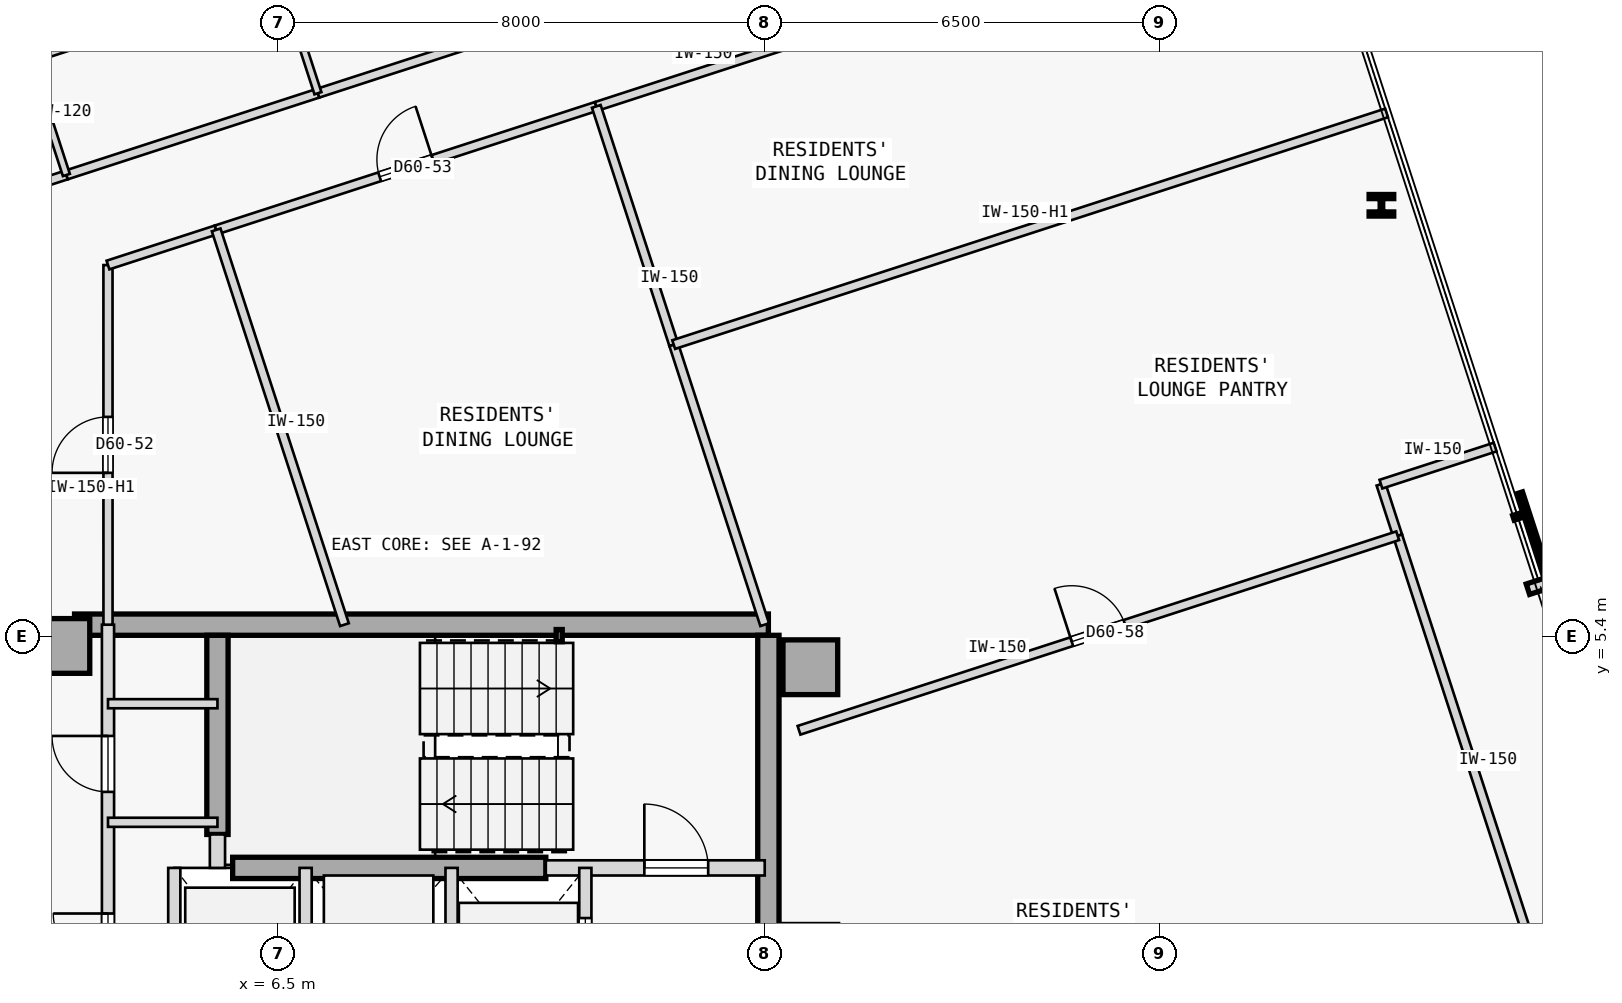
"""IFC4 building model, lengths in metres.
Left out: names, types, materials, properties, quantities, classifications, styles, units other than length and angle.
Written with IfcOpenShell. Run it as: python <this file> out.ifc"""

import sys

from ifc_helpers import new_model, si_unit, direction, frame, frame_2d, origin, origin_2d, place, context, subcontext, project, spatial, rectangle, hollow_rectangle, i_section, extrude, element, fill, save


model = new_model("IFC4")
c1 = context("Model", 3, precision=1e-05, world=origin(), true_north=direction((0.0, 1.0)))
c2 = subcontext(c1, "Body", "Model", "MODEL_VIEW")
j1 = project(units=[si_unit("LENGTHUNIT", "METRE"), si_unit("PLANEANGLEUNIT", "RADIAN")], contexts=[c1])
p1 = place(None, origin())
s1 = spatial("IfcSite", under=j1, at=p1, CompositionType="ELEMENT")
p2 = place(p1, origin())
s2 = spatial("IfcBuilding", under=s1, at=p2, CompositionType="ELEMENT")
p3 = place(p2, frame((0.0, 0.0, 227.65)))
s3 = spatial("IfcBuildingStorey", under=s2, at=p3, CompositionType="ELEMENT", Elevation=227.65)
for number, where, z_axis, x_axis in (
    (1, (15.25, 4.9, 0.0), (0.0, 0.0, 1.0), (1.0, 0.0, 0.0)),
    (2, (2.95, 5.25, 0.0), (0.0, 0.0, 1.0), (1.0, 0.0, 0.0)),
):
    element("IfcColumn", number, at=place(p3, frame(where, z_axis=z_axis, x_axis=x_axis)), inside=s3, PredefinedType="COLUMN", context=c2, shape_type="SweptSolid", body=[
        extrude(rectangle(XDim=0.9, YDim=0.9, at=origin_2d()), origin(), (0.0, 0.0, 1.0), 3.35),
    ])
p4 = place(p3, frame((3.15, 5.6, 0.0), z_axis=(0.0, 0.0, 1.0), x_axis=(1.0, 0.0, 0.0)))
e3 = element("IfcWall", 3, at=p4, inside=s3, PredefinedType="SHEAR", context=c2, shape_type="SweptSolid", body=[
    extrude(rectangle(XDim=11.41, YDim=0.35, at=frame_2d((5.705, 0.0))), origin(), (0.0, 0.0, 1.0), 3.125),
])
p5 = place(p3, frame((14.56, -5.425, 0.0), z_axis=(0.0, 0.0, 1.0), x_axis=(0.0, 1.0, 0.0)))
e4 = element("IfcWall", 4, at=p5, inside=s3, PredefinedType="SHEAR", context=c2, shape_type="SweptSolid", body=[
    extrude(rectangle(XDim=10.85, YDim=0.35, at=frame_2d((5.425, 0.0))), origin(), (0.0, 0.0, 1.0), 3.125),
])
p6 = place(p3, frame((5.5, 2.15, 0.0), z_axis=(0.0, 0.0, 1.0), x_axis=(0.0, 1.0, 0.0)))
e5 = element("IfcWall", 5, at=p6, inside=s3, PredefinedType="SHEAR", context=c2, shape_type="SweptSolid", body=[
    extrude(rectangle(XDim=3.275, YDim=0.35, at=frame_2d((1.638, 0.0))), origin(), (0.0, 0.0, 1.0), 3.125),
])
p7 = place(p3, frame((5.75, 1.6, 0.0), z_axis=(0.0, 0.0, 1.0), x_axis=(1.0, 0.0, 0.0)))
e6 = element("IfcWall", 6, at=p7, inside=s3, PredefinedType="SHEAR", context=c2, shape_type="SweptSolid", body=[
    extrude(rectangle(XDim=5.15, YDim=0.35, at=frame_2d((2.575, 0.0))), origin(), (0.0, 0.0, 1.0), 3.125),
])
p8 = place(p3, frame((11.12, 5.42, 0.0), z_axis=(0.0, 0.0, 1.0), x_axis=(1.0, 0.0, 0.0)))
e7 = element("IfcColumn", 7, at=p8, inside=s3, PredefinedType="COLUMN", context=c2, shape_type="SweptSolid", body=[
    extrude(hollow_rectangle(XDim=0.1, YDim=0.2, WallThickness=0.008, at=origin_2d()), origin(), (0.0, 0.0, 1.0), 3.35),
])
p9 = place(p3, frame((24.642, 12.497, 0.0), z_axis=(0.0, 0.0, 1.0), x_axis=(1.0, 0.0, 0.0)))
e8 = element("IfcColumn", 8, at=p9, inside=s3, PredefinedType="COLUMN", context=c2, shape_type="SweptSolid", body=[
    extrude(i_section(OverallWidth=0.405, OverallDepth=0.355, WebThickness=0.042, FlangeThickness=0.068, FilletRadius=0.015, at=origin_2d()), origin(), (0.0, 0.0, 1.0), 3.35),
])
p10 = place(p3, frame((10.9, 1.6, 0.0), z_axis=(0.0, 0.0, 1.0), x_axis=(1.0, 0.0, 0.0)))
e9 = element("IfcWall", 9, at=p10, inside=s3, PredefinedType="STANDARD", context=c2, shape_type="SweptSolid", body=[
    extrude(rectangle(XDim=3.6, YDim=0.25, at=frame_2d((1.8, 0.0))), origin(), (0.0, 0.0, 1.0), 3.125),
])
p11 = place(p10, frame((1.62, 0.0, 0.0)))
e10 = element("IfcOpeningElement", 10, at=p11, cuts=e9, PredefinedType="OPENING", context=c2, shape_type="SweptSolid", body=[
    extrude(rectangle(XDim=1.05, YDim=2.15, at=frame_2d((0.525, 1.075))), frame((0.0, 0.135, 0.0), z_axis=(0.0, -1.0, 0.0), x_axis=(1.0, 0.0, 0.0)), (0.0, 0.0, 1.0), 0.27),
])
p12 = place(p3, frame((5.5, 1.6, 0.0), z_axis=(0.0, 0.0, 1.0), x_axis=(0.0, 1.0, 0.0)))
e11 = element("IfcWall", 11, at=p12, inside=s3, PredefinedType="STANDARD", context=c2, shape_type="SweptSolid", body=[
    extrude(rectangle(XDim=0.55, YDim=0.25, at=frame_2d((0.275, 0.0))), origin(), (0.0, 0.0, 1.0), 3.125),
])
p13 = place(p3, frame((3.7, -1.15, 0.0), z_axis=(0.0, 0.0, 1.0), x_axis=(0.0, 1.0, 0.0)))
e12 = element("IfcWall", 12, at=p13, inside=s3, PredefinedType="STANDARD", context=c2, shape_type="SweptSolid", body=[
    extrude(rectangle(XDim=6.75, YDim=0.2, at=frame_2d((3.375, 0.0))), origin(), (0.0, 0.0, 1.0), 3.125),
])
p14 = place(p13, frame((1.1, 0.0, 0.0)))
e13 = element("IfcOpeningElement", 13, at=p14, cuts=e12, PredefinedType="OPENING", context=c2, shape_type="SweptSolid", body=[
    extrude(rectangle(XDim=0.9, YDim=2.15, at=frame_2d((0.45, 1.075))), frame((0.0, 0.11, 0.0), z_axis=(0.0, -1.0, 0.0), x_axis=(1.0, 0.0, 0.0)), (0.0, 0.0, 1.0), 0.22),
])
p15 = place(p13, frame((4.0, 0.0, 0.0)))
e14 = element("IfcOpeningElement", 14, at=p15, cuts=e12, PredefinedType="OPENING", context=c2, shape_type="SweptSolid", body=[
    extrude(rectangle(XDim=0.92, YDim=2.15, at=frame_2d((0.46, 1.075))), frame((0.0, 0.11, 0.0), z_axis=(0.0, -1.0, 0.0), x_axis=(1.0, 0.0, 0.0)), (0.0, 0.0, 1.0), 0.22),
])
p16 = place(p3, frame((11.55, -1.15, 0.0), z_axis=(0.0, 0.0, 1.0), x_axis=(0.0, 1.0, 0.0)))
e15 = element("IfcWall", 15, at=p16, inside=s3, PredefinedType="STANDARD", context=c2, shape_type="SweptSolid", body=[
    extrude(rectangle(XDim=2.75, YDim=0.2, at=frame_2d((1.375, 0.0))), origin(), (0.0, 0.0, 1.0), 3.125),
])
p17 = place(p16, frame((0.825, 0.0, 0.0)))
e16 = element("IfcOpeningElement", 16, at=p17, cuts=e15, PredefinedType="OPENING", context=c2, shape_type="SweptSolid", body=[
    extrude(rectangle(XDim=1.1, YDim=2.15, at=frame_2d((0.55, 1.075))), frame((0.0, 0.11, 0.0), z_axis=(0.0, -1.0, 0.0), x_axis=(1.0, 0.0, 0.0)), (0.0, 0.0, 1.0), 0.22),
])
for number, where, z_axis, x_axis in (
    (17, (9.35, -1.15, 0.0), (0.0, 0.0, 1.0), (0.0, 1.0, 0.0)),
    (18, (6.95, -1.15, 0.0), (0.0, 0.0, 1.0), (0.0, 1.0, 0.0)),
    (19, (4.79, -1.15, 0.0), (0.0, 0.0, 1.0), (0.0, 1.0, 0.0)),
):
    element("IfcWall", number, at=place(p3, frame(where, z_axis=z_axis, x_axis=x_axis)), inside=s3, PredefinedType="STANDARD", context=c2, shape_type="SweptSolid", body=[
        extrude(rectangle(XDim=2.75, YDim=0.2, at=frame_2d((1.375, 0.0))), origin(), (0.0, 0.0, 1.0), 3.125),
    ])
for number, where, z_axis, x_axis in (
    (20, (3.7, 4.3, 0.0), (0.0, 0.0, 1.0), (1.0, 0.0, 0.0)),
    (21, (3.7, 2.35, 0.0), (0.0, 0.0, 1.0), (1.0, 0.0, 0.0)),
):
    element("IfcWall", number, at=place(p3, frame(where, z_axis=z_axis, x_axis=x_axis)), inside=s3, PredefinedType="PARTITIONING", context=c2, shape_type="SweptSolid", body=[
        extrude(rectangle(XDim=1.8, YDim=0.15, at=frame_2d((0.9, 0.0))), origin(), (0.0, 0.0, 1.0), 3.125),
    ])
p18 = place(p3, frame((0.781, 12.269, 0.0), z_axis=(0.0, 0.0, 1.0), x_axis=(0.951066131077, 0.308987401554, 0.0)))
e22 = element("IfcWall", 22, at=p18, inside=s3, PredefinedType="PARTITIONING", context=c2, shape_type="SweptSolid", body=[
    extrude(rectangle(XDim=2.35, YDim=0.15, at=frame_2d((1.175, 0.0))), origin(), (0.0, 0.0, 1.0), 3.125),
])
p19 = place(p3, frame((3.015, 12.995, 0.0), z_axis=(0.0, 0.0, 1.0), x_axis=(0.951052627573, 0.309028962374, 0.0)))
e23 = element("IfcWall", 23, at=p19, inside=s3, PredefinedType="PARTITIONING", context=c2, shape_type="SweptSolid", body=[
    extrude(rectangle(XDim=4.35, YDim=0.15, at=frame_2d((2.175, 0.0))), origin(), (0.0, 0.0, 1.0), 3.125),
])
p20 = place(p3, frame((7.152, 14.339, 0.0), z_axis=(0.0, 0.0, 1.0), x_axis=(0.951062257173, 0.308999325213, 0.0)))
e24 = element("IfcWall", 24, at=p20, inside=s3, PredefinedType="PARTITIONING", context=c2, shape_type="SweptSolid", body=[
    extrude(rectangle(XDim=3.5, YDim=0.15, at=frame_2d((1.75, 0.0))), origin(), (0.0, 0.0, 1.0), 3.125),
])
p21 = place(p3, frame((3.7, 5.6, 0.0), z_axis=(0.0, 0.0, 1.0), x_axis=(-0.000123839008, 0.999999992332, 0.0)))
e25 = element("IfcWall", 25, at=p21, inside=s3, PredefinedType="PARTITIONING", context=c2, shape_type="SweptSolid", body=[
    extrude(rectangle(XDim=5.914, YDim=0.15, at=frame_2d((2.957, 0.0))), origin(), (0.0, 0.0, 1.0), 2.675),
])
p22 = place(p21, frame((2.497, 0.0, 0.0)))
e26 = element("IfcOpeningElement", 26, at=p22, cuts=e25, PredefinedType="OPENING", context=c2, shape_type="SweptSolid", body=[
    extrude(rectangle(XDim=0.92, YDim=2.15, at=frame_2d((0.46, 1.075))), frame((0.0, 0.085, 0.0), z_axis=(0.0, -1.0, 0.0), x_axis=(1.0, 0.0, 0.0)), (0.0, 0.0, 1.0), 0.17),
])
p23 = place(p3, frame((3.699, 11.514, 0.0), z_axis=(0.0, 0.0, 1.0), x_axis=(0.951069540665, 0.308976906612, 0.0)))
e27 = element("IfcWall", 27, at=p23, inside=s3, PredefinedType="PARTITIONING", context=c2, shape_type="SweptSolid", body=[
    extrude(rectangle(XDim=1.871, YDim=0.15, at=frame_2d((0.936, 0.0))), origin(), (0.0, 0.0, 1.0), 3.125),
])
p24 = place(p3, frame((5.479, 12.092, 0.0), z_axis=(0.0, 0.0, 1.0), x_axis=(0.951051809397, 0.309031480343, 0.0)))
e28 = element("IfcWall", 28, at=p24, inside=s3, PredefinedType="PARTITIONING", context=c2, shape_type="SweptSolid", body=[
    extrude(rectangle(XDim=6.573, YDim=0.15, at=frame_2d((3.287, 0.0))), origin(), (0.0, 0.0, 1.0), 3.125),
])
p25 = place(p24, frame((2.826, 0.0, 0.0)))
e29 = element("IfcOpeningElement", 29, at=p25, cuts=e28, PredefinedType="OPENING", context=c2, shape_type="SweptSolid", body=[
    extrude(rectangle(XDim=0.92, YDim=2.15, at=frame_2d((0.46, 1.075))), frame((0.0, 0.085, 0.0), z_axis=(0.0, -1.0, 0.0), x_axis=(1.0, 0.0, 0.0)), (0.0, 0.0, 1.0), 0.17),
])
p26 = place(p3, frame((27.637, -1.332, 0.0), z_axis=(0.0, 0.0, 1.0), x_axis=(-0.309040411618, 0.951048907253, 0.0)))
e30 = element("IfcWall", 30, at=p26, inside=s3, PredefinedType="PARTITIONING", context=c2, shape_type="SweptSolid", body=[
    extrude(rectangle(XDim=8.826, YDim=0.15, at=frame_2d((4.413, 0.0))), origin(), (0.0, 0.0, 1.0), 3.125),
])
p27 = place(p3, frame((24.909, 7.062, 0.0), z_axis=(0.0, 0.0, 1.0), x_axis=(-0.30899324298, 0.951064233263, 0.0)))
e31 = element("IfcWall", 31, at=p27, inside=s3, PredefinedType="PARTITIONING", context=c2, shape_type="SweptSolid", body=[
    extrude(rectangle(XDim=0.892, YDim=0.15, at=frame_2d((0.446, 0.0))), origin(), (0.0, 0.0, 1.0), 3.125),
])
p28 = place(p3, frame((24.634, 7.91, 0.0), z_axis=(0.0, 0.0, 1.0), x_axis=(0.951054051148, 0.309024581215, 0.0)))
e32 = element("IfcWall", 32, at=p28, inside=s3, PredefinedType="PARTITIONING", context=c2, shape_type="SweptSolid", body=[
    extrude(rectangle(XDim=1.975, YDim=0.15, at=frame_2d((0.988, 0.0))), origin(), (0.0, 0.0, 1.0), 3.125),
])
p29 = place(p3, frame((11.73, 14.123, 0.0), z_axis=(0.0, 0.0, 1.0), x_axis=(0.951060263663, 0.309005460926, 0.0)))
e33 = element("IfcWall", 33, at=p29, inside=s3, PredefinedType="PARTITIONING", context=c2, shape_type="SweptSolid", body=[
    extrude(rectangle(XDim=12.327, YDim=0.15, at=frame_2d((6.164, 0.0))), origin(), (0.0, 0.0, 1.0), 3.125),
])
p30 = place(p29, frame((5.704, 0.0, 0.0)))
e34 = element("IfcOpeningElement", 34, at=p30, cuts=e33, PredefinedType="OPENING", context=c2, shape_type="SweptSolid", body=[
    extrude(rectangle(XDim=0.92, YDim=2.15, at=frame_2d((0.46, 1.075))), frame((0.0, 0.085, 0.0), z_axis=(0.0, -1.0, 0.0), x_axis=(1.0, 0.0, 0.0)), (0.0, 0.0, 1.0), 0.17),
])
p31 = place(p3, frame((2.396, 14.902, 0.0), z_axis=(0.0, 0.0, 1.0), x_axis=(0.951057987102, 0.309012467661, 0.0)))
e35 = element("IfcWall", 35, at=p31, inside=s3, PredefinedType="PARTITIONING", context=c2, shape_type="SweptSolid", body=[
    extrude(rectangle(XDim=4.35, YDim=0.15, at=frame_2d((2.175, 0.0))), origin(), (0.0, 0.0, 1.0), 3.125),
])
p32 = place(p31, frame((1.725, 0.0, 0.0)))
e36 = element("IfcOpeningElement", 36, at=p32, cuts=e35, PredefinedType="OPENING", context=c2, shape_type="SweptSolid", body=[
    extrude(rectangle(XDim=0.9, YDim=2.15, at=frame_2d((0.45, 1.075))), frame((0.0, 0.085, 0.0), z_axis=(0.0, -1.0, 0.0), x_axis=(1.0, 0.0, 0.0)), (0.0, 0.0, 1.0), 0.17),
])
for number, where, z_axis, x_axis in (
    (37, (3.015, 12.995, 0.0), (0.0, 0.0, 1.0), (-0.309, 0.951, 0.0)),
    (38, (7.152, 14.339, 0.0), (0.0, 0.0, 1.0), (-0.309, 0.951, 0.0)),
):
    element("IfcWall", number, at=place(p3, frame(where, z_axis=z_axis, x_axis=x_axis)), inside=s3, PredefinedType="PARTITIONING", context=c2, shape_type="SweptSolid", body=[
        extrude(rectangle(XDim=2.005, YDim=0.12, at=frame_2d((1.002, 0.0))), origin(), (0.0, 0.0, 1.0), 3.125),
    ])
p33 = place(p3, frame((7.588, 5.6, 0.0), z_axis=(0.0, 0.0, 1.0), x_axis=(-0.309018946982, 0.951055881852, 0.0)))
e39 = element("IfcWall", 39, at=p33, inside=s3, PredefinedType="PARTITIONING", context=c2, shape_type="SweptSolid", body=[
    extrude(rectangle(XDim=6.826, YDim=0.15, at=frame_2d((3.413, 0.0))), origin(), (0.0, 0.0, 1.0), 3.125),
])
p34 = place(p3, frame((14.5, 5.6, 0.0), z_axis=(0.0, 0.0, 1.0), x_axis=(-0.308974360462, 0.951070367837, 0.0)))
e40 = element("IfcWall", 40, at=p34, inside=s3, PredefinedType="PARTITIONING", context=c2, shape_type="SweptSolid", body=[
    extrude(rectangle(XDim=4.843, YDim=0.15, at=frame_2d((2.421, 0.0))), origin(), (0.0, 0.0, 1.0), 3.125),
])
p35 = place(p3, frame((13.003, 10.206, 0.0), z_axis=(0.0, 0.0, 1.0), x_axis=(-0.309035144366, 0.951050618814, 0.0)))
e41 = element("IfcWall", 41, at=p35, inside=s3, PredefinedType="PARTITIONING", context=c2, shape_type="SweptSolid", body=[
    extrude(rectangle(XDim=4.119, YDim=0.15, at=frame_2d((2.06, 0.0))), origin(), (0.0, 0.0, 1.0), 3.125),
])
p36 = place(p3, frame((15.064, 3.863, 0.0), z_axis=(0.0, 0.0, 1.0), x_axis=(0.951061448945, 0.309001812827, 0.0)))
e42 = element("IfcWall", 42, at=p36, inside=s3, PredefinedType="PARTITIONING", context=c2, shape_type="SweptSolid", body=[
    extrude(rectangle(XDim=10.352, YDim=0.15, at=frame_2d((5.176, 0.0))), origin(), (0.0, 0.0, 1.0), 3.125),
])
p37 = place(p36, frame((4.716, 0.0, 0.0)))
e43 = element("IfcOpeningElement", 43, at=p37, cuts=e42, PredefinedType="OPENING", context=c2, shape_type="SweptSolid", body=[
    extrude(rectangle(XDim=0.92, YDim=2.15, at=frame_2d((0.46, 1.075))), frame((0.0, 0.085, 0.0), z_axis=(0.0, -1.0, 0.0), x_axis=(1.0, 0.0, 0.0)), (0.0, 0.0, 1.0), 0.17),
])
p38 = place(p3, frame((13.003, 10.206, 0.0), z_axis=(0.0, 0.0, 1.0), x_axis=(0.951060263663, 0.309005460926, 0.0)))
e44 = element("IfcWall", 44, at=p38, inside=s3, PredefinedType="PARTITIONING", context=c2, shape_type="SweptSolid", body=[
    extrude(rectangle(XDim=12.327, YDim=0.15, at=frame_2d((6.164, 0.0))), origin(), (0.0, 0.0, 1.0), 2.675),
])
p39 = place(p11, origin())
e45 = element("IfcDoor", 45, at=p39, inside=s3, OperationType="SINGLE_SWING_LEFT", PredefinedType="DOOR", context=c2, shape_type="SweptSolid", body=[
    extrude(rectangle(XDim=1.05, YDim=2.15, at=frame_2d((0.525, 1.075))), frame((0.0, 0.025, 0.0), z_axis=(0.0, -1.0, 0.0), x_axis=(1.0, 0.0, 0.0)), (0.0, 0.0, 1.0), 0.05),
])
fill(e10, e45)
p40 = place(p17, origin())
e46 = element("IfcDoor", 46, at=p40, inside=s3, OperationType="SLIDING_TO_RIGHT", PredefinedType="DOOR", context=c2, shape_type="SweptSolid", body=[
    extrude(rectangle(XDim=1.1, YDim=2.15, at=frame_2d((0.55, 1.075))), frame((0.0, 0.025, 0.0), z_axis=(0.0, -1.0, 0.0), x_axis=(1.0, 0.0, 0.0)), (0.0, 0.0, 1.0), 0.05),
])
fill(e16, e46)
p41 = place(p14, origin())
e47 = element("IfcDoor", 47, at=p41, inside=s3, OperationType="SINGLE_SWING_RIGHT", PredefinedType="DOOR", context=c2, shape_type="SweptSolid", body=[
    extrude(rectangle(XDim=0.9, YDim=2.15, at=frame_2d((0.45, 1.075))), frame((0.0, 0.025, 0.0), z_axis=(0.0, -1.0, 0.0), x_axis=(1.0, 0.0, 0.0)), (0.0, 0.0, 1.0), 0.05),
])
fill(e13, e47)
p42 = place(p15, origin())
e48 = element("IfcDoor", 48, at=p42, inside=s3, OperationType="SINGLE_SWING_RIGHT", PredefinedType="DOOR", context=c2, shape_type="SweptSolid", body=[
    extrude(rectangle(XDim=0.92, YDim=2.15, at=frame_2d((0.46, 1.075))), frame((0.0, 0.025, 0.0), z_axis=(0.0, -1.0, 0.0), x_axis=(1.0, 0.0, 0.0)), (0.0, 0.0, 1.0), 0.05),
])
fill(e14, e48)
p43 = place(p22, origin())
e49 = element("IfcDoor", 49, at=p43, inside=s3, OperationType="SINGLE_SWING_LEFT", PredefinedType="DOOR", context=c2, shape_type="SweptSolid", body=[
    extrude(rectangle(XDim=0.92, YDim=2.15, at=frame_2d((0.46, 1.075))), frame((0.0, 0.025, 0.0), z_axis=(0.0, -1.0, 0.0), x_axis=(1.0, 0.0, 0.0)), (0.0, 0.0, 1.0), 0.05),
])
fill(e26, e49)
p44 = place(p25, origin())
e50 = element("IfcDoor", 50, at=p44, inside=s3, OperationType="SINGLE_SWING_RIGHT", PredefinedType="DOOR", context=c2, shape_type="SweptSolid", body=[
    extrude(rectangle(XDim=0.92, YDim=2.15, at=frame_2d((0.46, 1.075))), frame((0.0, 0.025, 0.0), z_axis=(0.0, -1.0, 0.0), x_axis=(1.0, 0.0, 0.0)), (0.0, 0.0, 1.0), 0.05),
])
fill(e29, e50)
p45 = place(p37, origin())
e51 = element("IfcDoor", 51, at=p45, inside=s3, OperationType="SINGLE_SWING_LEFT", PredefinedType="DOOR", context=c2, shape_type="SweptSolid", body=[
    extrude(rectangle(XDim=0.92, YDim=2.15, at=frame_2d((0.46, 1.075))), frame((0.0, 0.025, 0.0), z_axis=(0.0, -1.0, 0.0), x_axis=(1.0, 0.0, 0.0)), (0.0, 0.0, 1.0), 0.05),
])
fill(e43, e51)
save(model, sys.argv[1])
